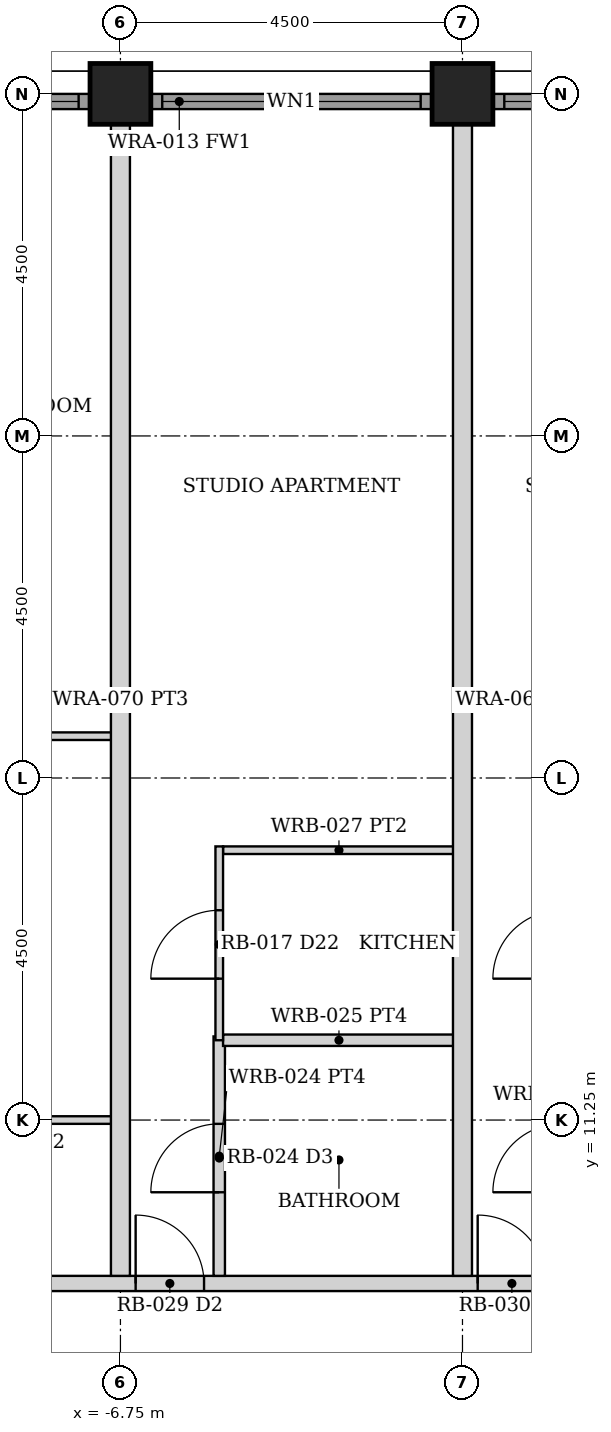
"""IFC4 building model, lengths in metres.
Left out: names, types, materials, properties, quantities, classifications, styles, units other than length and angle.
Written with IfcOpenShell. Run it as: python <this file> out.ifc"""

import sys

from ifc_helpers import new_model, si_unit, direction, frame, frame_2d, origin, origin_2d, place, context, subcontext, project, spatial, rectangle, hollow_rectangle, extrude, element, fill, save


model = new_model("IFC4")
c1 = context("Model", 3, precision=1e-05, world=origin(), true_north=direction((0.0, 1.0)))
c2 = subcontext(c1, "Body", "Model", "MODEL_VIEW")
j1 = project(units=[si_unit("LENGTHUNIT", "METRE"), si_unit("PLANEANGLEUNIT", "RADIAN")], contexts=[c1])
p1 = place(None, origin())
s1 = spatial("IfcSite", under=j1, at=p1, CompositionType="ELEMENT")
p2 = place(p1, origin())
s2 = spatial("IfcBuilding", under=s1, at=p2, CompositionType="ELEMENT")
p3 = place(p2, frame((0.0, 0.0, 37.0)))
s3 = spatial("IfcBuildingStorey", under=s2, at=p3, CompositionType="ELEMENT", Elevation=37.0)
for number, where, z_axis, x_axis in (
    (1, (-6.75, 24.75, 0.0), (0.0, 0.0, 1.0), (0.0, 1.0, 0.0)),
    (2, (-2.25, 24.75, 0.0), (0.0, 0.0, 1.0), (0.0, 1.0, 0.0)),
):
    element("IfcColumn", number, at=place(p3, frame(where, z_axis=z_axis, x_axis=x_axis)), inside=s3, PredefinedType="COLUMN", context=c2, shape_type="SweptSolid", body=[
        extrude(hollow_rectangle(XDim=0.8, YDim=0.8, WallThickness=0.07, at=origin_2d()), origin(), (0.0, 0.0, 1.0), 3.5),
    ])
p4 = place(p3, frame((-10.845, 24.65, 0.0), z_axis=(0.0, 0.0, 1.0), x_axis=(1.0, 0.0, 0.0)))
e3 = element("IfcWall", 3, at=p4, inside=s3, PredefinedType="SOLIDWALL", context=c2, shape_type="SweptSolid", body=[
    extrude(rectangle(XDim=3.69, YDim=0.2, at=frame_2d((1.845, 0.0))), origin(), (0.0, 0.0, 1.0), 2.379),
])
p5 = place(p4, frame((0.145, 0.0, 0.3)))
e4 = element("IfcOpeningElement", 4, at=p5, cuts=e3, PredefinedType="OPENING", context=c2, shape_type="SweptSolid", body=[
    extrude(rectangle(XDim=3.4, YDim=1.929, at=frame_2d((1.7, 0.964))), frame((0.0, 0.11, 0.0), z_axis=(0.0, -1.0, 0.0), x_axis=(1.0, 0.0, 0.0)), (0.0, 0.0, 1.0), 0.22),
])
p6 = place(p3, frame((-6.345, 24.65, 0.0), z_axis=(0.0, 0.0, 1.0), x_axis=(1.0, 0.0, 0.0)))
e5 = element("IfcWall", 5, at=p6, inside=s3, PredefinedType="SOLIDWALL", context=c2, shape_type="SweptSolid", body=[
    extrude(rectangle(XDim=3.69, YDim=0.2, at=frame_2d((1.845, 0.0))), origin(), (0.0, 0.0, 1.0), 2.379),
])
p7 = place(p6, frame((0.145, 0.0, 0.3)))
e6 = element("IfcOpeningElement", 6, at=p7, cuts=e5, PredefinedType="OPENING", context=c2, shape_type="SweptSolid", body=[
    extrude(rectangle(XDim=3.4, YDim=1.929, at=frame_2d((1.7, 0.964))), frame((0.0, 0.11, 0.0), z_axis=(0.0, -1.0, 0.0), x_axis=(1.0, 0.0, 0.0)), (0.0, 0.0, 1.0), 0.22),
])
p8 = place(p3, frame((-1.845, 24.65, 0.0), z_axis=(0.0, 0.0, 1.0), x_axis=(1.0, 0.0, 0.0)))
e7 = element("IfcWall", 7, at=p8, inside=s3, PredefinedType="SOLIDWALL", context=c2, shape_type="SweptSolid", body=[
    extrude(rectangle(XDim=3.69, YDim=0.2, at=frame_2d((1.845, 0.0))), origin(), (0.0, 0.0, 1.0), 2.379),
])
p9 = place(p8, frame((0.145, 0.0, 0.3)))
e8 = element("IfcOpeningElement", 8, at=p9, cuts=e7, PredefinedType="OPENING", context=c2, shape_type="SweptSolid", body=[
    extrude(rectangle(XDim=3.4, YDim=1.929, at=frame_2d((1.7, 0.964))), frame((0.0, 0.11, 0.0), z_axis=(0.0, -1.0, 0.0), x_axis=(1.0, 0.0, 0.0)), (0.0, 0.0, 1.0), 0.22),
])
p10 = place(p3, frame((-24.55, 9.1, 0.0), z_axis=(0.0, 0.0, 1.0), x_axis=(1.0, 0.0, 0.0)))
e9 = element("IfcWall", 9, at=p10, inside=s3, PredefinedType="PARTITIONING", context=c2, shape_type="SweptSolid", body=[
    extrude(rectangle(XDim=49.1, YDim=0.2, at=frame_2d((24.55, 0.0))), origin(), (0.0, 0.0, 1.0), 2.373),
])
p11 = place(p10, frame((5.1, 0.0, 0.0)))
e10 = element("IfcOpeningElement", 10, at=p11, cuts=e9, PredefinedType="OPENING", context=c2, shape_type="SweptSolid", body=[
    extrude(rectangle(XDim=0.9, YDim=2.1, at=frame_2d((0.45, 1.05))), frame((0.0, 0.11, 0.0), z_axis=(0.0, -1.0, 0.0), x_axis=(1.0, 0.0, 0.0)), (0.0, 0.0, 1.0), 0.22),
])
p12 = place(p10, frame((13.6, 0.0, 0.0)))
e11 = element("IfcOpeningElement", 11, at=p12, cuts=e9, PredefinedType="OPENING", context=c2, shape_type="SweptSolid", body=[
    extrude(rectangle(XDim=0.9, YDim=2.1, at=frame_2d((0.45, 1.05))), frame((0.0, 0.11, 0.0), z_axis=(0.0, -1.0, 0.0), x_axis=(1.0, 0.0, 0.0)), (0.0, 0.0, 1.0), 0.22),
])
p13 = place(p10, frame((18.0, 0.0, 0.0)))
e12 = element("IfcOpeningElement", 12, at=p13, cuts=e9, PredefinedType="OPENING", context=c2, shape_type="SweptSolid", body=[
    extrude(rectangle(XDim=0.9, YDim=2.1, at=frame_2d((0.45, 1.05))), frame((0.0, 0.11, 0.0), z_axis=(0.0, -1.0, 0.0), x_axis=(1.0, 0.0, 0.0)), (0.0, 0.0, 1.0), 0.22),
])
p14 = place(p10, frame((22.5, 0.0, 0.0)))
e13 = element("IfcOpeningElement", 13, at=p14, cuts=e9, PredefinedType="OPENING", context=c2, shape_type="SweptSolid", body=[
    extrude(rectangle(XDim=0.9, YDim=2.1, at=frame_2d((0.45, 1.05))), frame((0.0, 0.11, 0.0), z_axis=(0.0, -1.0, 0.0), x_axis=(1.0, 0.0, 0.0)), (0.0, 0.0, 1.0), 0.22),
])
p15 = place(p10, frame((27.0, 0.0, 0.0)))
e14 = element("IfcOpeningElement", 14, at=p15, cuts=e9, PredefinedType="OPENING", context=c2, shape_type="SweptSolid", body=[
    extrude(rectangle(XDim=0.9, YDim=2.1, at=frame_2d((0.45, 1.05))), frame((0.0, 0.11, 0.0), z_axis=(0.0, -1.0, 0.0), x_axis=(1.0, 0.0, 0.0)), (0.0, 0.0, 1.0), 0.22),
])
p16 = place(p10, frame((31.6, 0.0, 0.0)))
e15 = element("IfcOpeningElement", 15, at=p16, cuts=e9, PredefinedType="OPENING", context=c2, shape_type="SweptSolid", body=[
    extrude(rectangle(XDim=0.9, YDim=2.1, at=frame_2d((0.45, 1.05))), frame((0.0, 0.11, 0.0), z_axis=(0.0, -1.0, 0.0), x_axis=(1.0, 0.0, 0.0)), (0.0, 0.0, 1.0), 0.22),
])
p17 = place(p10, frame((43.1, 0.0, 0.0)))
e16 = element("IfcOpeningElement", 16, at=p17, cuts=e9, PredefinedType="OPENING", context=c2, shape_type="SweptSolid", body=[
    extrude(rectangle(XDim=0.9, YDim=2.1, at=frame_2d((0.45, 1.05))), frame((0.0, 0.11, 0.0), z_axis=(0.0, -1.0, 0.0), x_axis=(1.0, 0.0, 0.0)), (0.0, 0.0, 1.0), 0.22),
])
p18 = place(p3, frame((-9.95, 11.25, 0.0), z_axis=(0.0, 0.0, 1.0), x_axis=(1.0, 0.0, 0.0)))
e17 = element("IfcWall", 17, at=p18, inside=s3, PredefinedType="PARTITIONING", context=c2, shape_type="SweptSolid", body=[
    extrude(rectangle(XDim=3.14, YDim=0.1, at=frame_2d((1.57, 0.0))), origin(), (0.0, 0.0, 1.0), 2.373),
])
p19 = place(p3, frame((-11.2, 16.3, 0.0), z_axis=(0.0, 0.0, 1.0), x_axis=(1.0, 0.0, 0.0)))
e18 = element("IfcWall", 18, at=p19, inside=s3, PredefinedType="PARTITIONING", context=c2, shape_type="SweptSolid", body=[
    extrude(rectangle(XDim=4.39, YDim=0.1, at=frame_2d((2.195, 0.0))), origin(), (0.0, 0.0, 1.0), 2.373),
])
p20 = place(p19, frame((0.15, 0.0, 0.0)))
e19 = element("IfcOpeningElement", 19, at=p20, cuts=e18, PredefinedType="OPENING", context=c2, shape_type="SweptSolid", body=[
    extrude(rectangle(XDim=0.9, YDim=2.1, at=frame_2d((0.45, 1.05))), frame((0.0, 0.06, 0.0), z_axis=(0.0, -1.0, 0.0), x_axis=(1.0, 0.0, 0.0)), (0.0, 0.0, 1.0), 0.12),
])
p21 = place(p3, frame((-5.45, 9.2, 0.0), z_axis=(0.0, 0.0, 1.0), x_axis=(0.0, 1.0, 0.0)))
e20 = element("IfcWall", 20, at=p21, inside=s3, PredefinedType="PARTITIONING", context=c2, shape_type="SweptSolid", body=[
    extrude(rectangle(XDim=3.15, YDim=0.15, at=frame_2d((1.575, 0.0))), origin(), (0.0, 0.0, 1.0), 2.373),
])
p22 = place(p21, frame((1.1, 0.0, 0.0)))
e21 = element("IfcOpeningElement", 21, at=p22, cuts=e20, PredefinedType="OPENING", context=c2, shape_type="SweptSolid", body=[
    extrude(rectangle(XDim=0.9, YDim=2.1, at=frame_2d((0.45, 1.05))), frame((0.0, 0.085, 0.0), z_axis=(0.0, -1.0, 0.0), x_axis=(1.0, 0.0, 0.0)), (0.0, 0.0, 1.0), 0.17),
])
p23 = place(p3, frame((-5.4, 12.3, 0.0), z_axis=(0.0, 0.0, 1.0), x_axis=(1.0, 0.0, 0.0)))
e22 = element("IfcWall", 22, at=p23, inside=s3, PredefinedType="PARTITIONING", context=c2, shape_type="SweptSolid", body=[
    extrude(rectangle(XDim=3.05, YDim=0.15, at=frame_2d((1.525, 0.0))), origin(), (0.0, 0.0, 1.0), 2.373),
])
p24 = place(p3, frame((-5.4, 14.8, 0.0), z_axis=(0.0, 0.0, 1.0), x_axis=(1.0, 0.0, 0.0)))
e23 = element("IfcWall", 23, at=p24, inside=s3, PredefinedType="PARTITIONING", context=c2, shape_type="SweptSolid", body=[
    extrude(rectangle(XDim=3.05, YDim=0.1, at=frame_2d((1.525, 0.0))), origin(), (0.0, 0.0, 1.0), 2.373),
])
p25 = place(p3, frame((-5.45, 12.3, 0.0), z_axis=(0.0, 0.0, 1.0), x_axis=(0.0, 1.0, 0.0)))
e24 = element("IfcWall", 24, at=p25, inside=s3, PredefinedType="PARTITIONING", context=c2, shape_type="SweptSolid", body=[
    extrude(rectangle(XDim=2.55, YDim=0.1, at=frame_2d((1.275, 0.0))), origin(), (0.0, 0.0, 1.0), 2.373),
])
p26 = place(p25, frame((0.81, 0.0, 0.0)))
e25 = element("IfcOpeningElement", 25, at=p26, cuts=e24, PredefinedType="OPENING", context=c2, shape_type="SweptSolid", body=[
    extrude(rectangle(XDim=0.9, YDim=2.1, at=frame_2d((0.45, 1.05))), frame((0.0, 0.06, 0.0), z_axis=(0.0, -1.0, 0.0), x_axis=(1.0, 0.0, 0.0)), (0.0, 0.0, 1.0), 0.12),
])
for number, where, z_axis, x_axis in (
    (26, (-6.75, 9.2, 0.0), (0.0, 0.0, 1.0), (0.0, 1.0, 0.0)),
    (27, (-2.25, 9.2, 0.0), (0.0, 0.0, 1.0), (0.0, 1.0, 0.0)),
):
    element("IfcWall", number, at=place(p3, frame(where, z_axis=z_axis, x_axis=x_axis)), inside=s3, PredefinedType="PARTITIONING", context=c2, shape_type="SweptSolid", body=[
        extrude(rectangle(XDim=15.15, YDim=0.25, at=frame_2d((7.575, 0.0))), origin(), (0.0, 0.0, 1.0), 2.373),
    ])
p27 = place(p5, origin())
e28 = element("IfcWindow", 28, at=p27, inside=s3, PartitioningType="SINGLE_PANEL", PredefinedType="WINDOW", context=c2, shape_type="SweptSolid", body=[
    extrude(rectangle(XDim=3.4, YDim=1.929, at=frame_2d((1.7, 0.964))), frame((0.0, 0.03, 0.0), z_axis=(0.0, -1.0, 0.0), x_axis=(1.0, 0.0, 0.0)), (0.0, 0.0, 1.0), 0.06),
])
fill(e4, e28)
p28 = place(p7, origin())
e29 = element("IfcWindow", 29, at=p28, inside=s3, PartitioningType="SINGLE_PANEL", PredefinedType="WINDOW", context=c2, shape_type="SweptSolid", body=[
    extrude(rectangle(XDim=3.4, YDim=1.929, at=frame_2d((1.7, 0.964))), frame((0.0, 0.03, 0.0), z_axis=(0.0, -1.0, 0.0), x_axis=(1.0, 0.0, 0.0)), (0.0, 0.0, 1.0), 0.06),
])
fill(e6, e29)
p29 = place(p9, origin())
e30 = element("IfcWindow", 30, at=p29, inside=s3, PartitioningType="SINGLE_PANEL", PredefinedType="WINDOW", context=c2, shape_type="SweptSolid", body=[
    extrude(rectangle(XDim=3.4, YDim=1.929, at=frame_2d((1.7, 0.964))), frame((0.0, 0.03, 0.0), z_axis=(0.0, -1.0, 0.0), x_axis=(1.0, 0.0, 0.0)), (0.0, 0.0, 1.0), 0.06),
])
fill(e8, e30)
p30 = place(p13, origin())
e31 = element("IfcDoor", 31, at=p30, inside=s3, OperationType="SINGLE_SWING_LEFT", PredefinedType="DOOR", context=c2, shape_type="SweptSolid", body=[
    extrude(rectangle(XDim=0.9, YDim=2.1, at=frame_2d((0.45, 1.05))), frame((0.0, 0.025, 0.0), z_axis=(0.0, -1.0, 0.0), x_axis=(1.0, 0.0, 0.0)), (0.0, 0.0, 1.0), 0.05),
])
fill(e12, e31)
p31 = place(p22, origin())
e32 = element("IfcDoor", 32, at=p31, inside=s3, OperationType="SINGLE_SWING_LEFT", PredefinedType="DOOR", context=c2, shape_type="SweptSolid", body=[
    extrude(rectangle(XDim=0.9, YDim=2.1, at=frame_2d((0.45, 1.05))), frame((0.0, 0.025, 0.0), z_axis=(0.0, -1.0, 0.0), x_axis=(1.0, 0.0, 0.0)), (0.0, 0.0, 1.0), 0.05),
])
fill(e21, e32)
p32 = place(p26, origin())
e33 = element("IfcDoor", 33, at=p32, inside=s3, OperationType="SINGLE_SWING_LEFT", PredefinedType="DOOR", context=c2, shape_type="SweptSolid", body=[
    extrude(rectangle(XDim=0.9, YDim=2.1, at=frame_2d((0.45, 1.05))), frame((0.0, 0.025, 0.0), z_axis=(0.0, -1.0, 0.0), x_axis=(1.0, 0.0, 0.0)), (0.0, 0.0, 1.0), 0.05),
])
fill(e25, e33)
p33 = place(p14, origin())
e34 = element("IfcDoor", 34, at=p33, inside=s3, OperationType="SINGLE_SWING_LEFT", PredefinedType="DOOR", context=c2, shape_type="SweptSolid", body=[
    extrude(rectangle(XDim=0.9, YDim=2.1, at=frame_2d((0.45, 1.05))), frame((0.0, 0.025, 0.0), z_axis=(0.0, -1.0, 0.0), x_axis=(1.0, 0.0, 0.0)), (0.0, 0.0, 1.0), 0.05),
])
fill(e13, e34)
save(model, sys.argv[1])
